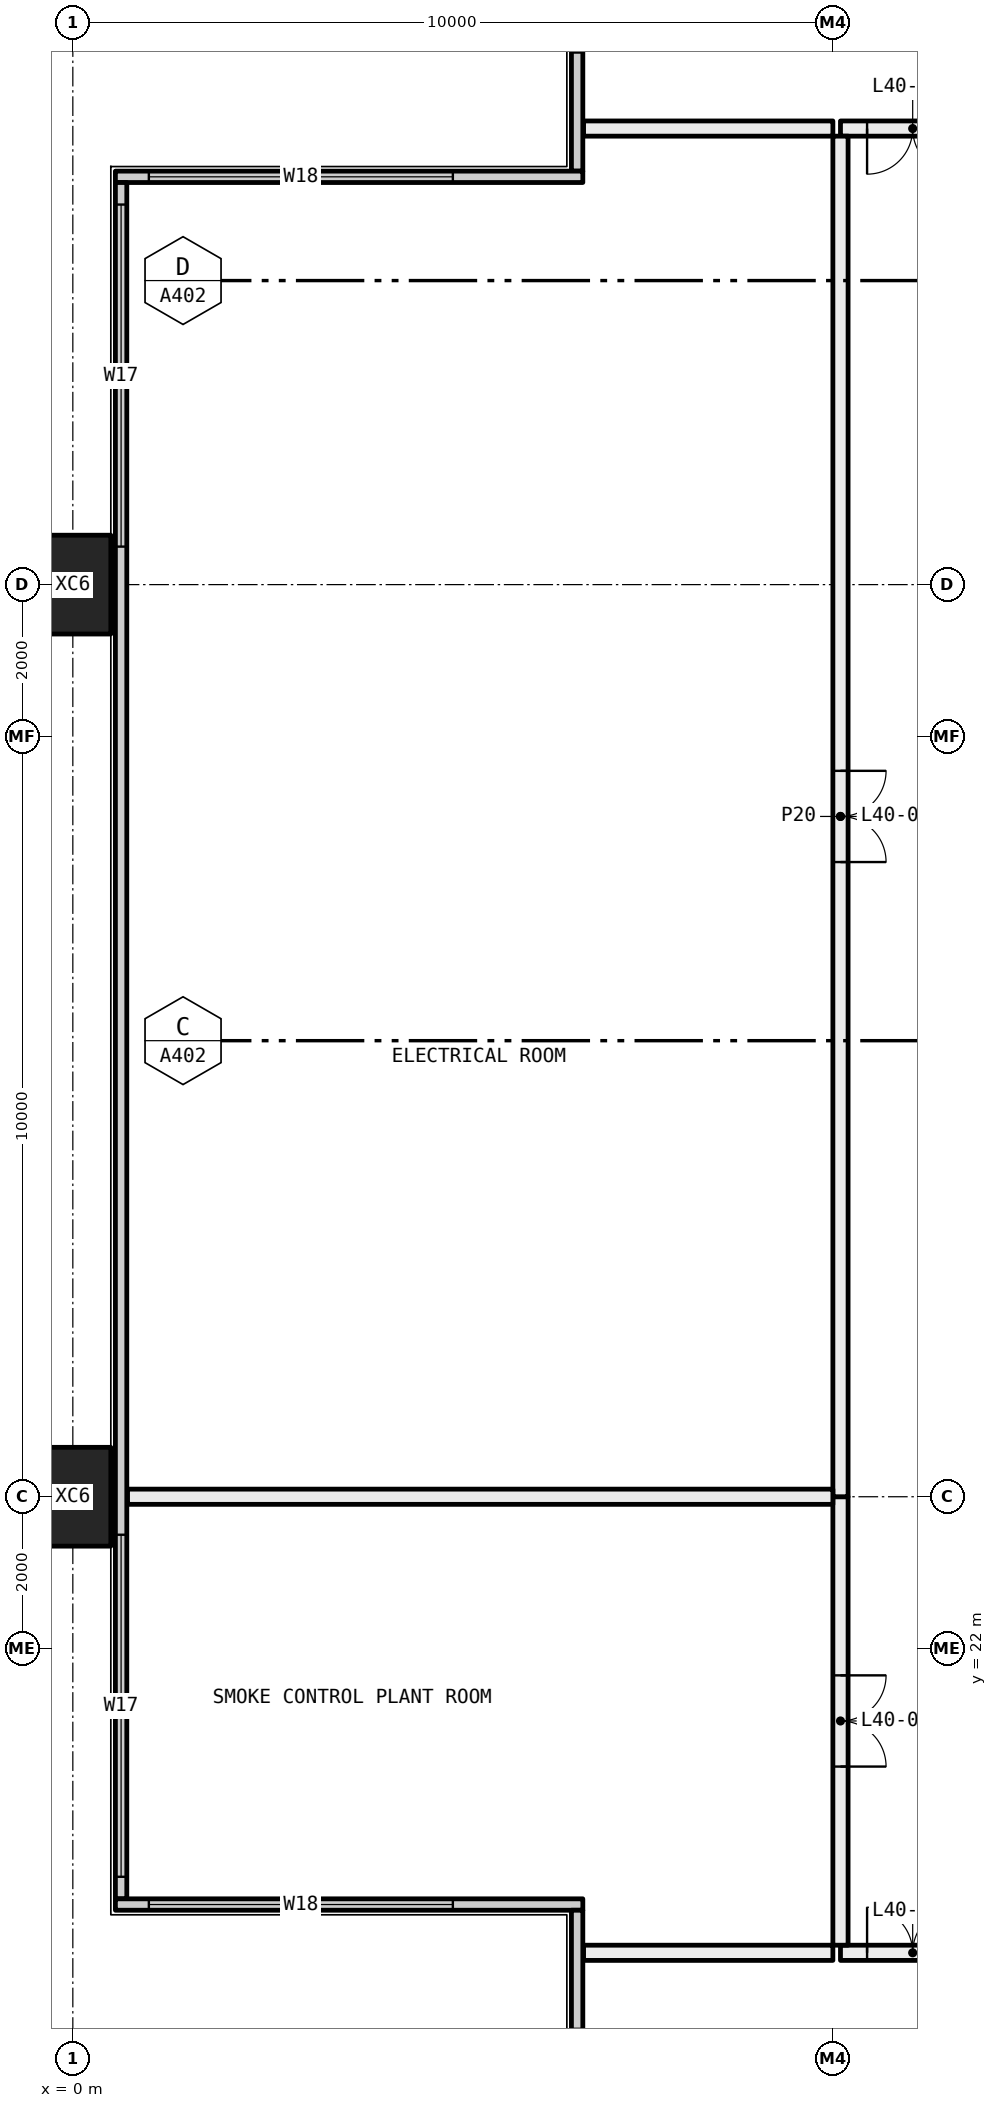
"""IFC4 building model, lengths in metres.
Left out: names, types, materials, properties, quantities, classifications, styles, units other than length and angle.
Written with IfcOpenShell. Run it as: python <this file> out.ifc"""

import sys

from ifc_helpers import new_model, si_unit, direction, frame, frame_2d, origin, origin_2d, place, context, subcontext, project, spatial, rectangle, hollow_rectangle, extrude, element, fill, save


model = new_model("IFC4")
c1 = context("Model", 3, precision=1e-05, world=origin(), true_north=direction((0.0, 1.0)))
c2 = subcontext(c1, "Body", "Model", "MODEL_VIEW")
j1 = project(units=[si_unit("LENGTHUNIT", "METRE"), si_unit("PLANEANGLEUNIT", "RADIAN")], contexts=[c1])
p1 = place(None, origin())
s1 = spatial("IfcSite", under=j1, at=p1, CompositionType="ELEMENT")
p2 = place(p1, origin())
s2 = spatial("IfcBuilding", under=s1, at=p2, CompositionType="ELEMENT")
p3 = place(p2, frame((0.0, 0.0, 153.75)))
s3 = spatial("IfcBuildingStorey", under=s2, at=p3, CompositionType="ELEMENT", Elevation=153.75)
for number, where, z_axis, x_axis in (
    (1, (0.0, 24.0, -0.4), (0.0, 0.0, 1.0), (0.0, 1.0, 0.0)),
    (2, (0.0, 36.0, -0.4), (0.0, 0.0, 1.0), (0.0, 1.0, 0.0)),
):
    element("IfcColumn", number, at=place(p3, frame(where, z_axis=z_axis, x_axis=x_axis)), inside=s3, PredefinedType="COLUMN", context=c2, shape_type="SweptSolid", body=[
        extrude(hollow_rectangle(XDim=1.3, YDim=1.0, WallThickness=0.05, at=origin_2d()), origin(), (0.0, 0.0, 1.0), 4.5),
    ])
p4 = place(p3, frame((6.635, 41.44, 0.0), z_axis=(0.0, 0.0, 1.0), x_axis=(0.0, 1.0, 0.0)))
e3 = element("IfcWall", 3, at=p4, inside=s3, PredefinedType="ELEMENTEDWALL", context=c2, shape_type="SweptSolid", body=[
    extrude(rectangle(XDim=5.85, YDim=0.15, at=frame_2d((2.925, 0.0))), origin(), (0.0, 0.0, 1.0), 4.1),
])
p5 = place(p4, frame((1.56, 0.0, 0.45)))
e4 = element("IfcOpeningElement", 4, at=p5, cuts=e3, PredefinedType="OPENING", context=c2, shape_type="SweptSolid", body=[
    extrude(rectangle(XDim=4.0, YDim=3.6, at=frame_2d((2.0, 1.8))), frame((0.0, 0.085, 0.0), z_axis=(0.0, -1.0, 0.0), x_axis=(1.0, 0.0, 0.0)), (0.0, 0.0, 1.0), 0.17),
])
p6 = place(p3, frame((0.56, 41.365, 0.0), z_axis=(0.0, 0.0, 1.0), x_axis=(1.0, 0.0, 0.0)))
e5 = element("IfcWall", 5, at=p6, inside=s3, PredefinedType="ELEMENTEDWALL", context=c2, shape_type="SweptSolid", body=[
    extrude(rectangle(XDim=6.15, YDim=0.15, at=frame_2d((3.075, 0.0))), origin(), (0.0, 0.0, 1.0), 4.1),
])
p7 = place(p6, frame((0.44, 0.0, 0.45)))
e6 = element("IfcOpeningElement", 6, at=p7, cuts=e5, PredefinedType="OPENING", context=c2, shape_type="SweptSolid", body=[
    extrude(rectangle(XDim=4.0, YDim=3.6, at=frame_2d((2.0, 1.8))), frame((0.0, 0.085, 0.0), z_axis=(0.0, -1.0, 0.0), x_axis=(1.0, 0.0, 0.0)), (0.0, 0.0, 1.0), 0.17),
])
p8 = place(p3, frame((0.635, 18.71, 0.0), z_axis=(0.0, 0.0, 1.0), x_axis=(0.0, 1.0, 0.0)))
e7 = element("IfcWall", 7, at=p8, inside=s3, PredefinedType="ELEMENTEDWALL", context=c2, shape_type="SweptSolid", body=[
    extrude(rectangle(XDim=22.58, YDim=0.15, at=frame_2d((11.29, 0.0))), origin(), (0.0, 0.0, 1.0), 4.1),
])
p9 = place(p8, frame((0.29, 0.0, 0.45)))
e8 = element("IfcOpeningElement", 8, at=p9, cuts=e7, PredefinedType="OPENING", context=c2, shape_type="SweptSolid", body=[
    extrude(rectangle(XDim=4.5, YDim=3.6, at=frame_2d((2.25, 1.8))), frame((0.0, 0.085, 0.0), z_axis=(0.0, -1.0, 0.0), x_axis=(1.0, 0.0, 0.0)), (0.0, 0.0, 1.0), 0.17),
])
p10 = place(p8, frame((17.79, 0.0, 0.45)))
e9 = element("IfcOpeningElement", 9, at=p10, cuts=e7, PredefinedType="OPENING", context=c2, shape_type="SweptSolid", body=[
    extrude(rectangle(XDim=4.5, YDim=3.6, at=frame_2d((2.25, 1.8))), frame((0.0, 0.085, 0.0), z_axis=(0.0, -1.0, 0.0), x_axis=(1.0, 0.0, 0.0)), (0.0, 0.0, 1.0), 0.17),
])
p11 = place(p3, frame((0.56, 18.635, 0.0), z_axis=(0.0, 0.0, 1.0), x_axis=(1.0, 0.0, 0.0)))
e10 = element("IfcWall", 10, at=p11, inside=s3, PredefinedType="ELEMENTEDWALL", context=c2, shape_type="SweptSolid", body=[
    extrude(rectangle(XDim=6.15, YDim=0.15, at=frame_2d((3.075, 0.0))), origin(), (0.0, 0.0, 1.0), 4.1),
])
p12 = place(p11, frame((0.44, 0.0, 0.45)))
e11 = element("IfcOpeningElement", 11, at=p12, cuts=e10, PredefinedType="OPENING", context=c2, shape_type="SweptSolid", body=[
    extrude(rectangle(XDim=4.0, YDim=3.6, at=frame_2d((2.0, 1.8))), frame((0.0, 0.085, 0.0), z_axis=(0.0, -1.0, 0.0), x_axis=(1.0, 0.0, 0.0)), (0.0, 0.0, 1.0), 0.17),
])
p13 = place(p3, frame((6.635, 12.71, 0.0), z_axis=(0.0, 0.0, 1.0), x_axis=(0.0, 1.0, 0.0)))
e12 = element("IfcWall", 12, at=p13, inside=s3, PredefinedType="ELEMENTEDWALL", context=c2, shape_type="SweptSolid", body=[
    extrude(rectangle(XDim=5.85, YDim=0.15, at=frame_2d((2.925, 0.0))), origin(), (0.0, 0.0, 1.0), 4.1),
])
p14 = place(p13, frame((0.29, 0.0, 0.45)))
e13 = element("IfcOpeningElement", 13, at=p14, cuts=e12, PredefinedType="OPENING", context=c2, shape_type="SweptSolid", body=[
    extrude(rectangle(XDim=4.0, YDim=3.6, at=frame_2d((2.0, 1.8))), frame((0.0, 0.085, 0.0), z_axis=(0.0, -1.0, 0.0), x_axis=(1.0, 0.0, 0.0)), (0.0, 0.0, 1.0), 0.17),
])
p15 = place(p3, frame((10.1, 18.0, 0.0), z_axis=(0.0, 0.0, 1.0), x_axis=(1.0, 0.0, 0.0)))
e14 = element("IfcWall", 14, at=p15, inside=s3, PredefinedType="PARTITIONING", context=c2, shape_type="SweptSolid", body=[
    extrude(rectangle(XDim=1.9, YDim=0.2, at=frame_2d((0.95, 0.0))), origin(), (0.0, 0.0, 1.0), 4.1),
])
p16 = place(p15, frame((0.35, 0.0, 0.0)))
e15 = element("IfcOpeningElement", 15, at=p16, cuts=e14, PredefinedType="OPENING", context=c2, shape_type="SweptSolid", body=[
    extrude(rectangle(XDim=1.2, YDim=2.1, at=frame_2d((0.6, 1.05))), frame((0.0, 0.11, 0.0), z_axis=(0.0, -1.0, 0.0), x_axis=(1.0, 0.0, 0.0)), (0.0, 0.0, 1.0), 0.22),
])
p17 = place(p3, frame((12.0, 42.0, 0.0), z_axis=(0.0, 0.0, 1.0), x_axis=(-1.0, 0.0, 0.0)))
e16 = element("IfcWall", 16, at=p17, inside=s3, PredefinedType="PARTITIONING", context=c2, shape_type="SweptSolid", body=[
    extrude(rectangle(XDim=1.9, YDim=0.2, at=frame_2d((0.95, 0.0))), origin(), (0.0, 0.0, 1.0), 4.1),
])
p18 = place(p17, frame((0.35, 0.0, 0.0)))
e17 = element("IfcOpeningElement", 17, at=p18, cuts=e16, PredefinedType="OPENING", context=c2, shape_type="SweptSolid", body=[
    extrude(rectangle(XDim=1.2, YDim=2.1, at=frame_2d((0.6, 1.05))), frame((0.0, 0.11, 0.0), z_axis=(0.0, -1.0, 0.0), x_axis=(1.0, 0.0, 0.0)), (0.0, 0.0, 1.0), 0.22),
])
p19 = place(p3, frame((10.1, 24.0, 0.0), z_axis=(0.0, 0.0, 1.0), x_axis=(0.0, -1.0, 0.0)))
e18 = element("IfcWall", 18, at=p19, inside=s3, PredefinedType="PARTITIONING", context=c2, shape_type="SweptSolid", body=[
    extrude(rectangle(XDim=5.9, YDim=0.2, at=frame_2d((2.95, 0.0))), origin(), (0.0, 0.0, 1.0), 3.5),
])
p20 = place(p19, frame((2.35, 0.0, 0.0)))
e19 = element("IfcOpeningElement", 19, at=p20, cuts=e18, PredefinedType="OPENING", context=c2, shape_type="SweptSolid", body=[
    extrude(rectangle(XDim=1.2, YDim=2.1, at=frame_2d((0.6, 1.05))), frame((0.0, 0.11, 0.0), z_axis=(0.0, -1.0, 0.0), x_axis=(1.0, 0.0, 0.0)), (0.0, 0.0, 1.0), 0.22),
])
p21 = place(p3, frame((10.1, 41.9, 0.0), z_axis=(0.0, 0.0, 1.0), x_axis=(0.0, -1.0, 0.0)))
e20 = element("IfcWall", 20, at=p21, inside=s3, PredefinedType="PARTITIONING", context=c2, shape_type="SweptSolid", body=[
    extrude(rectangle(XDim=17.9, YDim=0.2, at=frame_2d((8.95, 0.0))), origin(), (0.0, 0.0, 1.0), 3.5),
])
p22 = place(p21, frame((8.35, 0.0, 0.0)))
e21 = element("IfcOpeningElement", 21, at=p22, cuts=e20, PredefinedType="OPENING", context=c2, shape_type="SweptSolid", body=[
    extrude(rectangle(XDim=1.2, YDim=2.1, at=frame_2d((0.6, 1.05))), frame((0.0, 0.11, 0.0), z_axis=(0.0, -1.0, 0.0), x_axis=(1.0, 0.0, 0.0)), (0.0, 0.0, 1.0), 0.22),
])
for number, where, z_axis, x_axis in (
    (22, (10.0, 18.0, 0.0), (0.0, 0.0, 1.0), (-1.0, 0.0, 0.0)),
    (23, (6.72, 42.0, 0.0), (0.0, 0.0, 1.0), (1.0, 0.0, 0.0)),
):
    element("IfcWall", number, at=place(p3, frame(where, z_axis=z_axis, x_axis=x_axis)), inside=s3, PredefinedType="PARTITIONING", context=c2, shape_type="SweptSolid", body=[
        extrude(rectangle(XDim=3.28, YDim=0.2, at=frame_2d((1.64, 0.0))), origin(), (0.0, 0.0, 1.0), 4.1),
    ])
p23 = place(p3, frame((10.0, 24.0, 0.0), z_axis=(0.0, 0.0, 1.0), x_axis=(-1.0, 0.0, 0.0)))
e24 = element("IfcWall", 24, at=p23, inside=s3, PredefinedType="PARTITIONING", context=c2, shape_type="SweptSolid", body=[
    extrude(rectangle(XDim=9.28, YDim=0.2, at=frame_2d((4.64, 0.0))), origin(), (0.0, 0.0, 1.0), 3.5),
])
p24 = place(p7, origin())
e25 = element("IfcWindow", 25, at=p24, inside=s3, PartitioningType="SINGLE_PANEL", PredefinedType="WINDOW", context=c2, shape_type="SweptSolid", body=[
    extrude(rectangle(XDim=4.0, YDim=3.6, at=frame_2d((2.0, 1.8))), frame((0.0, 0.03, 0.0), z_axis=(0.0, -1.0, 0.0), x_axis=(1.0, 0.0, 0.0)), (0.0, 0.0, 1.0), 0.06),
])
fill(e6, e25)
p25 = place(p9, origin())
e26 = element("IfcWindow", 26, at=p25, inside=s3, PartitioningType="SINGLE_PANEL", PredefinedType="WINDOW", context=c2, shape_type="SweptSolid", body=[
    extrude(rectangle(XDim=4.5, YDim=3.6, at=frame_2d((2.25, 1.8))), frame((0.0, 0.03, 0.0), z_axis=(0.0, -1.0, 0.0), x_axis=(1.0, 0.0, 0.0)), (0.0, 0.0, 1.0), 0.06),
])
fill(e8, e26)
p26 = place(p10, origin())
e27 = element("IfcWindow", 27, at=p26, inside=s3, PartitioningType="SINGLE_PANEL", PredefinedType="WINDOW", context=c2, shape_type="SweptSolid", body=[
    extrude(rectangle(XDim=4.5, YDim=3.6, at=frame_2d((2.25, 1.8))), frame((0.0, 0.03, 0.0), z_axis=(0.0, -1.0, 0.0), x_axis=(1.0, 0.0, 0.0)), (0.0, 0.0, 1.0), 0.06),
])
fill(e9, e27)
p27 = place(p12, origin())
e28 = element("IfcWindow", 28, at=p27, inside=s3, PartitioningType="SINGLE_PANEL", PredefinedType="WINDOW", context=c2, shape_type="SweptSolid", body=[
    extrude(rectangle(XDim=4.0, YDim=3.6, at=frame_2d((2.0, 1.8))), frame((0.0, 0.03, 0.0), z_axis=(0.0, -1.0, 0.0), x_axis=(1.0, 0.0, 0.0)), (0.0, 0.0, 1.0), 0.06),
])
fill(e11, e28)
p28 = place(p16, origin())
e29 = element("IfcDoor", 29, at=p28, inside=s3, OperationType="DOUBLE_DOOR_SINGLE_SWING", PredefinedType="DOOR", context=c2, shape_type="SweptSolid", body=[
    extrude(rectangle(XDim=1.2, YDim=2.1, at=frame_2d((0.6, 1.05))), frame((0.0, 0.025, 0.0), z_axis=(0.0, -1.0, 0.0), x_axis=(1.0, 0.0, 0.0)), (0.0, 0.0, 1.0), 0.05),
])
fill(e15, e29)
p29 = place(p18, origin())
e30 = element("IfcDoor", 30, at=p29, inside=s3, OperationType="DOUBLE_DOOR_SINGLE_SWING", PredefinedType="DOOR", context=c2, shape_type="SweptSolid", body=[
    extrude(rectangle(XDim=1.2, YDim=2.1, at=frame_2d((0.6, 1.05))), frame((0.0, 0.025, 0.0), z_axis=(0.0, -1.0, 0.0), x_axis=(1.0, 0.0, 0.0)), (0.0, 0.0, 1.0), 0.05),
])
fill(e17, e30)
p30 = place(p20, origin())
e31 = element("IfcDoor", 31, at=p30, inside=s3, OperationType="DOUBLE_DOOR_SINGLE_SWING", PredefinedType="DOOR", context=c2, shape_type="SweptSolid", body=[
    extrude(rectangle(XDim=1.2, YDim=2.1, at=frame_2d((0.6, 1.05))), frame((0.0, 0.025, 0.0), z_axis=(0.0, -1.0, 0.0), x_axis=(1.0, 0.0, 0.0)), (0.0, 0.0, 1.0), 0.05),
])
fill(e19, e31)
p31 = place(p22, origin())
e32 = element("IfcDoor", 32, at=p31, inside=s3, OperationType="DOUBLE_DOOR_SINGLE_SWING", PredefinedType="DOOR", context=c2, shape_type="SweptSolid", body=[
    extrude(rectangle(XDim=1.2, YDim=2.1, at=frame_2d((0.6, 1.05))), frame((0.0, 0.025, 0.0), z_axis=(0.0, -1.0, 0.0), x_axis=(1.0, 0.0, 0.0)), (0.0, 0.0, 1.0), 0.05),
])
fill(e21, e32)
save(model, sys.argv[1])
